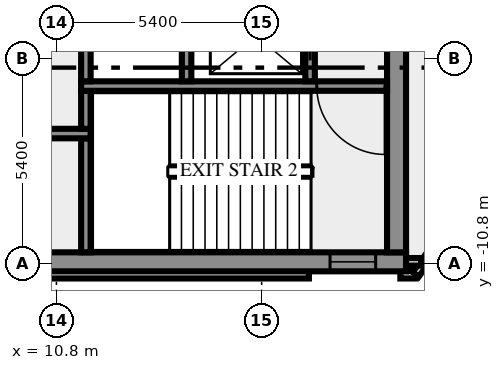
"""IFC4 building model, lengths in metres.
Left out: names, types, materials, properties, quantities, classifications, styles, units other than length and angle.
Written with IfcOpenShell. Run it as: python <this file> out.ifc"""

import sys

from ifc_helpers import new_model, si_unit, direction, frame, frame_2d, origin, place, context, subcontext, project, spatial, rectangle, extrude, element, fill, save


model = new_model("IFC4")
c1 = context("Model", 3, precision=1e-05, world=origin(), true_north=direction((0.0, 1.0)))
c2 = subcontext(c1, "Body", "Model", "MODEL_VIEW")
j1 = project(units=[si_unit("LENGTHUNIT", "METRE"), si_unit("PLANEANGLEUNIT", "RADIAN")], contexts=[c1])
p1 = place(None, origin())
s1 = spatial("IfcSite", under=j1, at=p1, CompositionType="ELEMENT")
p2 = place(p1, origin())
s2 = spatial("IfcBuilding", under=s1, at=p2, CompositionType="ELEMENT")
p3 = place(p2, frame((0.0, 0.0, 289.0)))
s3 = spatial("IfcBuildingStorey", under=s2, at=p3, CompositionType="ELEMENT", Elevation=289.0)
p4 = place(p3, frame((-17.444, -11.088, 0.0), z_axis=(0.0, 0.0, 1.0), x_axis=(1.0, 0.0, 0.0)))
e1 = element("IfcWall", 1, at=p4, inside=s3, PredefinedType="SOLIDWALL", context=c2, shape_type="SweptSolid", body=[
    extrude(rectangle(XDim=34.888, YDim=0.2, at=frame_2d((17.444, 0.0))), origin(), (0.0, 0.0, 1.0), 3.65),
])
p5 = place(p3, frame((19.85, -11.088, 0.0), z_axis=(0.0, 0.0, 1.0), x_axis=(1.0, 0.0, 0.0)))
e2 = element("IfcWall", 2, at=p5, inside=s3, PredefinedType="SOLIDWALL", context=c2, shape_type="SweptSolid", body=[
    extrude(rectangle(XDim=0.406, YDim=0.2, at=frame_2d((0.203, 0.0))), origin(), (0.0, 0.0, 1.0), 3.65),
])
p6 = place(p3, frame((20.253, -11.083, 0.0), z_axis=(0.0, 0.0, 1.0), x_axis=(0.587766567315, 0.809030569476, 0.0)))
e3 = element("IfcWall", 3, at=p6, inside=s3, PredefinedType="SOLIDWALL", context=c2, shape_type="SweptSolid", body=[
    extrude(rectangle(XDim=2.688, YDim=0.2, at=frame_2d((1.344, 0.0))), origin(), (0.0, 0.0, 1.0), 3.65),
])
p7 = place(p3, frame((19.98, -10.75, 0.0), z_axis=(0.0, 0.0, 1.0), x_axis=(1.0, 0.0, 0.0)))
e4 = element("IfcWall", 4, at=p7, inside=s3, PredefinedType="SOLIDWALL", context=c2, shape_type="SweptSolid", body=[
    extrude(rectangle(XDim=0.417, YDim=0.2, at=frame_2d((0.208, 0.0))), origin(), (0.0, 0.0, 1.0), 3.65),
])
p8 = place(p3, frame((-20.0, -10.75, 0.0), z_axis=(0.0, 0.0, 1.0), x_axis=(1.0, 0.0, 0.0)))
e5 = element("IfcWall", 5, at=p8, inside=s3, PredefinedType="SHEAR", context=c2, shape_type="SweptSolid", body=[
    extrude(rectangle(XDim=40.0, YDim=0.5, at=frame_2d((20.0, 0.0))), origin(), (0.0, 0.0, 1.0), 3.65),
])
p9 = place(p8, frame((0.8, 0.0, 1.0)))
e6 = element("IfcOpeningElement", 6, at=p9, cuts=e5, PredefinedType="OPENING", context=c2, shape_type="SweptSolid", body=[
    extrude(rectangle(XDim=1.2, YDim=1.2, at=frame_2d((0.6, 0.6))), frame((0.0, 0.26, 0.0), z_axis=(0.0, -1.0, 0.0), x_axis=(1.0, 0.0, 0.0)), (0.0, 0.0, 1.0), 0.52),
])
p10 = place(p8, frame((38.0, 0.0, 1.0)))
e7 = element("IfcOpeningElement", 7, at=p10, cuts=e5, PredefinedType="OPENING", context=c2, shape_type="SweptSolid", body=[
    extrude(rectangle(XDim=1.2, YDim=1.2, at=frame_2d((0.6, 0.6))), frame((0.0, 0.26, 0.0), z_axis=(0.0, -1.0, 0.0), x_axis=(1.0, 0.0, 0.0)), (0.0, 0.0, 1.0), 0.52),
])
p11 = place(p3, frame((11.575, -10.5, 0.0), z_axis=(0.0, 0.0, 1.0), x_axis=(0.0, 1.0, 0.0)))
e8 = element("IfcWall", 8, at=p11, inside=s3, PredefinedType="SHEAR", context=c2, shape_type="SweptSolid", body=[
    extrude(rectangle(XDim=3.0, YDim=0.25, at=frame_2d((1.5, 0.0))), origin(), (0.0, 0.0, 1.0), 3.65),
])
p12 = place(p3, frame((19.75, -10.5, 0.0), z_axis=(0.0, 0.0, 1.0), x_axis=(0.0, 1.0, 0.0)))
e9 = element("IfcWall", 9, at=p12, inside=s3, PredefinedType="SHEAR", context=c2, shape_type="SweptSolid", body=[
    extrude(rectangle(XDim=8.8, YDim=0.5, at=frame_2d((4.4, 0.0))), origin(), (0.0, 0.0, 1.0), 3.65),
])
p13 = place(p3, frame((11.7, -7.375, 0.0), z_axis=(0.0, 0.0, 1.0), x_axis=(-1.0, 0.0, 0.0)))
e10 = element("IfcWall", 10, at=p13, inside=s3, PredefinedType="SHEAR", context=c2, shape_type="SweptSolid", body=[
    extrude(rectangle(XDim=23.4, YDim=0.25, at=frame_2d((11.7, 0.0))), origin(), (0.0, 0.0, 1.0), 3.65),
])
p14 = place(p13, frame((22.225, 0.0, 0.0)))
e11 = element("IfcOpeningElement", 11, at=p14, cuts=e10, PredefinedType="OPENING", context=c2, shape_type="SweptSolid", body=[
    extrude(rectangle(XDim=0.8, YDim=2.1, at=frame_2d((0.4, 1.05))), frame((0.0, 0.135, 0.0), z_axis=(0.0, -1.0, 0.0), x_axis=(1.0, 0.0, 0.0)), (0.0, 0.0, 1.0), 0.27),
])
p15 = place(p13, frame((20.2, 0.0, 0.0)))
e12 = element("IfcOpeningElement", 12, at=p15, cuts=e10, PredefinedType="OPENING", context=c2, shape_type="SweptSolid", body=[
    extrude(rectangle(XDim=1.1, YDim=2.1, at=frame_2d((0.55, 1.05))), frame((0.0, 0.135, 0.0), z_axis=(0.0, -1.0, 0.0), x_axis=(1.0, 0.0, 0.0)), (0.0, 0.0, 1.0), 0.27),
])
p16 = place(p13, frame((17.7, 0.0, 0.0)))
e13 = element("IfcOpeningElement", 13, at=p16, cuts=e10, PredefinedType="OPENING", context=c2, shape_type="SweptSolid", body=[
    extrude(rectangle(XDim=1.1, YDim=2.1, at=frame_2d((0.55, 1.05))), frame((0.0, 0.135, 0.0), z_axis=(0.0, -1.0, 0.0), x_axis=(1.0, 0.0, 0.0)), (0.0, 0.0, 1.0), 0.27),
])
p17 = place(p13, frame((15.975, 0.0, 0.0)))
e14 = element("IfcOpeningElement", 14, at=p17, cuts=e10, PredefinedType="OPENING", context=c2, shape_type="SweptSolid", body=[
    extrude(rectangle(XDim=0.8, YDim=2.1, at=frame_2d((0.4, 1.05))), frame((0.0, 0.135, 0.0), z_axis=(0.0, -1.0, 0.0), x_axis=(1.0, 0.0, 0.0)), (0.0, 0.0, 1.0), 0.27),
])
p18 = place(p13, frame((14.5, 0.0, 0.0)))
e15 = element("IfcOpeningElement", 15, at=p18, cuts=e10, PredefinedType="OPENING", context=c2, shape_type="SweptSolid", body=[
    extrude(rectangle(XDim=0.9, YDim=2.1, at=frame_2d((0.45, 1.05))), frame((0.0, 0.135, 0.0), z_axis=(0.0, -1.0, 0.0), x_axis=(1.0, 0.0, 0.0)), (0.0, 0.0, 1.0), 0.27),
])
p19 = place(p13, frame((12.95, 0.0, 0.0)))
e16 = element("IfcOpeningElement", 16, at=p19, cuts=e10, PredefinedType="OPENING", context=c2, shape_type="SweptSolid", body=[
    extrude(rectangle(XDim=0.9, YDim=2.1, at=frame_2d((0.45, 1.05))), frame((0.0, 0.135, 0.0), z_axis=(0.0, -1.0, 0.0), x_axis=(1.0, 0.0, 0.0)), (0.0, 0.0, 1.0), 0.27),
])
p20 = place(p13, frame((11.475, 0.0, 0.0)))
e17 = element("IfcOpeningElement", 17, at=p20, cuts=e10, PredefinedType="OPENING", context=c2, shape_type="SweptSolid", body=[
    extrude(rectangle(XDim=0.9, YDim=2.1, at=frame_2d((0.45, 1.05))), frame((0.0, 0.135, 0.0), z_axis=(0.0, -1.0, 0.0), x_axis=(1.0, 0.0, 0.0)), (0.0, 0.0, 1.0), 0.27),
])
p21 = place(p13, frame((10.45, 0.0, 0.0)))
e18 = element("IfcOpeningElement", 18, at=p21, cuts=e10, PredefinedType="OPENING", context=c2, shape_type="SweptSolid", body=[
    extrude(rectangle(XDim=0.5, YDim=2.1, at=frame_2d((0.25, 1.05))), frame((0.0, 0.135, 0.0), z_axis=(0.0, -1.0, 0.0), x_axis=(1.0, 0.0, 0.0)), (0.0, 0.0, 1.0), 0.27),
])
p22 = place(p13, frame((7.987, 0.0, 0.0)))
e19 = element("IfcOpeningElement", 19, at=p22, cuts=e10, PredefinedType="OPENING", context=c2, shape_type="SweptSolid", body=[
    extrude(rectangle(XDim=0.9, YDim=2.1, at=frame_2d((0.45, 1.05))), frame((0.0, 0.135, 0.0), z_axis=(0.0, -1.0, 0.0), x_axis=(1.0, 0.0, 0.0)), (0.0, 0.0, 1.0), 0.27),
])
p23 = place(p13, frame((3.012, 0.0, 0.0)))
e20 = element("IfcOpeningElement", 20, at=p23, cuts=e10, PredefinedType="OPENING", context=c2, shape_type="SweptSolid", body=[
    extrude(rectangle(XDim=0.9, YDim=2.1, at=frame_2d((0.45, 1.05))), frame((0.0, 0.135, 0.0), z_axis=(0.0, -1.0, 0.0), x_axis=(1.0, 0.0, 0.0)), (0.0, 0.0, 1.0), 0.27),
])
p24 = place(p3, frame((11.575, -7.25, 0.0), z_axis=(0.0, 0.0, 1.0), x_axis=(0.0, 1.0, 0.0)))
e21 = element("IfcWall", 21, at=p24, inside=s3, PredefinedType="SHEAR", context=c2, shape_type="SweptSolid", body=[
    extrude(rectangle(XDim=1.0, YDim=0.25, at=frame_2d((0.5, 0.0))), origin(), (0.0, 0.0, 1.0), 3.65),
])
p25 = place(p3, frame((19.5, -6.125, 0.0), z_axis=(0.0, 0.0, 1.0), x_axis=(-1.0, 0.0, 0.0)))
e22 = element("IfcWall", 22, at=p25, inside=s3, PredefinedType="SHEAR", context=c2, shape_type="SweptSolid", body=[
    extrude(rectangle(XDim=8.05, YDim=0.25, at=frame_2d((4.025, 0.0))), origin(), (0.0, 0.0, 1.0), 3.65),
])
p26 = place(p25, frame((0.05, 0.0, 0.0)))
e23 = element("IfcOpeningElement", 23, at=p26, cuts=e22, PredefinedType="OPENING", context=c2, shape_type="SweptSolid", body=[
    extrude(rectangle(XDim=1.8, YDim=2.1, at=frame_2d((0.9, 1.05))), frame((0.0, 0.135, 0.0), z_axis=(0.0, -1.0, 0.0), x_axis=(1.0, 0.0, 0.0)), (0.0, 0.0, 1.0), 0.27),
])
p27 = place(p3, frame((11.575, -6.0, 0.0), z_axis=(0.0, 0.0, 1.0), x_axis=(0.0, 1.0, 0.0)))
e24 = element("IfcWall", 24, at=p27, inside=s3, PredefinedType="SHEAR", context=c2, shape_type="SweptSolid", body=[
    extrude(rectangle(XDim=1.75, YDim=0.25, at=frame_2d((0.875, 0.0))), origin(), (0.0, 0.0, 1.0), 3.65),
])
p28 = place(p3, frame((14.225, -6.0, 0.0), z_axis=(0.0, 0.0, 1.0), x_axis=(0.0, 1.0, 0.0)))
e25 = element("IfcWall", 25, at=p28, inside=s3, PredefinedType="SHEAR", context=c2, shape_type="SweptSolid", body=[
    extrude(rectangle(XDim=4.3, YDim=0.25, at=frame_2d((2.15, 0.0))), origin(), (0.0, 0.0, 1.0), 3.65),
])
p29 = place(p3, frame((17.475, -6.0, 0.0), z_axis=(0.0, 0.0, 1.0), x_axis=(0.0, 1.0, 0.0)))
e26 = element("IfcWall", 26, at=p29, inside=s3, PredefinedType="SHEAR", context=c2, shape_type="SweptSolid", body=[
    extrude(rectangle(XDim=4.3, YDim=0.25, at=frame_2d((2.15, 0.0))), origin(), (0.0, 0.0, 1.0), 3.65),
])
p30 = place(p29, frame((0.55, 0.0, 0.0)))
e27 = element("IfcOpeningElement", 27, at=p30, cuts=e26, PredefinedType="OPENING", context=c2, shape_type="SweptSolid", body=[
    extrude(rectangle(XDim=1.3, YDim=2.1, at=frame_2d((0.65, 1.05))), frame((0.0, 0.135, 0.0), z_axis=(0.0, -1.0, 0.0), x_axis=(1.0, 0.0, 0.0)), (0.0, 0.0, 1.0), 0.27),
])
p31 = place(p10, origin())
e28 = element("IfcWindow", 28, at=p31, inside=s3, PartitioningType="SINGLE_PANEL", PredefinedType="WINDOW", context=c2, shape_type="SweptSolid", body=[
    extrude(rectangle(XDim=1.2, YDim=1.2, at=frame_2d((0.6, 0.6))), frame((0.0, 0.03, 0.0), z_axis=(0.0, -1.0, 0.0), x_axis=(1.0, 0.0, 0.0)), (0.0, 0.0, 1.0), 0.06),
])
fill(e7, e28)
p32 = place(p26, origin())
e29 = element("IfcDoor", 29, at=p32, inside=s3, OperationType="DOUBLE_DOOR_SINGLE_SWING", PredefinedType="DOOR", context=c2, shape_type="SweptSolid", body=[
    extrude(rectangle(XDim=1.8, YDim=2.1, at=frame_2d((0.9, 1.05))), frame((0.0, 0.025, 0.0), z_axis=(0.0, -1.0, 0.0), x_axis=(1.0, 0.0, 0.0)), (0.0, 0.0, 1.0), 0.05),
])
fill(e23, e29)
p33 = place(p30, origin())
e30 = element("IfcDoor", 30, at=p33, inside=s3, OperationType="DOUBLE_DOOR_SLIDING", PredefinedType="DOOR", context=c2, shape_type="SweptSolid", body=[
    extrude(rectangle(XDim=1.3, YDim=2.1, at=frame_2d((0.65, 1.05))), frame((0.0, 0.025, 0.0), z_axis=(0.0, -1.0, 0.0), x_axis=(1.0, 0.0, 0.0)), (0.0, 0.0, 1.0), 0.05),
])
fill(e27, e30)
save(model, sys.argv[1])
